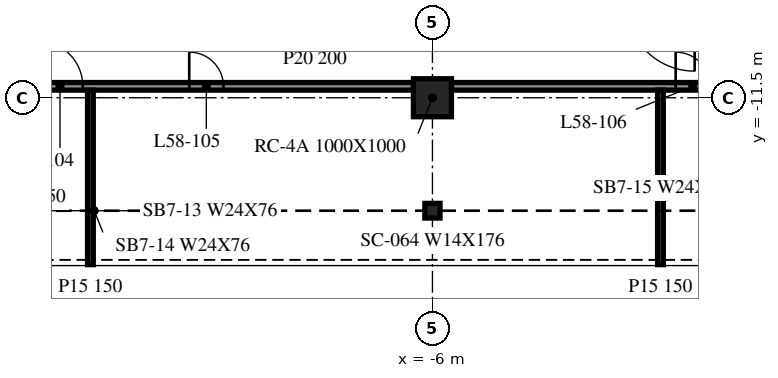
"""IFC4 building model, lengths in metres.
Left out: names, types, materials, properties, quantities, classifications, styles, units other than length and angle.
Written with IfcOpenShell. Run it as: python <this file> out.ifc"""

import sys

from ifc_helpers import new_model, si_unit, direction, frame, frame_2d, origin, origin_2d, place, context, subcontext, project, spatial, rectangle, i_section, extrude, element, fill, save


model = new_model("IFC4")
c1 = context("Model", 3, precision=1e-05, world=origin(), true_north=direction((0.0, 1.0)))
c2 = subcontext(c1, "Body", "Model", "MODEL_VIEW")
j1 = project(units=[si_unit("LENGTHUNIT", "METRE"), si_unit("PLANEANGLEUNIT", "RADIAN")], contexts=[c1])
p1 = place(None, origin())
s1 = spatial("IfcSite", under=j1, at=p1, CompositionType="ELEMENT")
p2 = place(p1, origin())
s2 = spatial("IfcBuilding", under=s1, at=p2, CompositionType="ELEMENT")
p3 = place(p2, frame((0.0, 0.0, 240.0)))
s3 = spatial("IfcBuildingStorey", under=s2, at=p3, CompositionType="ELEMENT", Elevation=240.0)
p4 = place(p3, frame((-6.0, -11.5, -0.34), z_axis=(0.0, 0.0, 1.0), x_axis=(1.0, 0.0, 0.0)))
e1 = element("IfcColumn", 1, at=p4, inside=s3, PredefinedType="COLUMN", context=c2, shape_type="SweptSolid", body=[
    extrude(rectangle(XDim=1.0, YDim=1.0, at=origin_2d()), origin(), (0.0, 0.0, 1.0), 3.8),
])
p5 = place(p3, frame((-6.0, -14.473, -0.34), z_axis=(0.0, 0.0, 1.0), x_axis=(1.0, 0.0, 0.0)))
e2 = element("IfcColumn", 2, at=p5, inside=s3, PredefinedType="COLUMN", context=c2, shape_type="SweptSolid", body=[
    extrude(i_section(OverallWidth=0.399, OverallDepth=0.386, WebThickness=0.021, FlangeThickness=0.033, at=origin_2d()), origin(), (0.0, 0.0, 1.0), 3.8),
])
p6 = place(p3, frame((-17.5, -11.2, 0.0), z_axis=(0.0, 0.0, 1.0), x_axis=(1.0, 0.0, 0.0)))
e3 = element("IfcWall", 3, at=p6, inside=s3, PredefinedType="PARTITIONING", context=c2, shape_type="SweptSolid", body=[
    extrude(rectangle(XDim=11.0, YDim=0.2, at=frame_2d((5.5, 0.0))), origin(), (0.0, 0.0, 1.0), 3.46),
])
p7 = place(p6, frame((1.1, 0.0, 0.0)))
e4 = element("IfcOpeningElement", 4, at=p7, cuts=e3, PredefinedType="OPENING", context=c2, shape_type="SweptSolid", body=[
    extrude(rectangle(XDim=1.2, YDim=2.1, at=frame_2d((0.6, 1.05))), frame((0.0, 0.11, 0.0), z_axis=(0.0, -1.0, 0.0), x_axis=(1.0, 0.0, 0.0)), (0.0, 0.0, 1.0), 0.22),
])
p8 = place(p6, frame((5.1, 0.0, 0.0)))
e5 = element("IfcOpeningElement", 5, at=p8, cuts=e3, PredefinedType="OPENING", context=c2, shape_type="SweptSolid", body=[
    extrude(rectangle(XDim=0.9, YDim=2.1, at=frame_2d((0.45, 1.05))), frame((0.0, 0.11, 0.0), z_axis=(0.0, -1.0, 0.0), x_axis=(1.0, 0.0, 0.0)), (0.0, 0.0, 1.0), 0.22),
])
p9 = place(p3, frame((-5.5, -11.2, 0.0), z_axis=(0.0, 0.0, 1.0), x_axis=(1.0, 0.0, 0.0)))
e6 = element("IfcWall", 6, at=p9, inside=s3, PredefinedType="PARTITIONING", context=c2, shape_type="SweptSolid", body=[
    extrude(rectangle(XDim=11.0, YDim=0.2, at=frame_2d((5.5, 0.0))), origin(), (0.0, 0.0, 1.0), 3.46),
])
p10 = place(p9, frame((5.9, 0.0, 0.0)))
e7 = element("IfcOpeningElement", 7, at=p10, cuts=e6, PredefinedType="OPENING", context=c2, shape_type="SweptSolid", body=[
    extrude(rectangle(XDim=0.9, YDim=2.1, at=frame_2d((0.45, 1.05))), frame((0.0, 0.11, 0.0), z_axis=(0.0, -1.0, 0.0), x_axis=(1.0, 0.0, 0.0)), (0.0, 0.0, 1.0), 0.22),
])
for number, where, z_axis, x_axis in (
    (8, (-15.0, -15.892, 0.0), (0.0, 0.0, 1.0), (0.0, 1.0, 0.0)),
    (9, (0.0, -15.892, 0.0), (0.0, 0.0, 1.0), (0.0, 1.0, 0.0)),
):
    element("IfcWall", number, at=place(p3, frame(where, z_axis=z_axis, x_axis=x_axis)), inside=s3, PredefinedType="PARTITIONING", context=c2, shape_type="SweptSolid", body=[
        extrude(rectangle(XDim=4.592, YDim=0.15, at=frame_2d((2.296, 0.0))), origin(), (0.0, 0.0, 1.0), 3.46),
    ])
p11 = place(p7, origin())
e10 = element("IfcDoor", 10, at=p11, inside=s3, OperationType="SINGLE_SWING_RIGHT", PredefinedType="DOOR", context=c2, shape_type="SweptSolid", body=[
    extrude(rectangle(XDim=1.2, YDim=2.1, at=frame_2d((0.6, 1.05))), frame((0.0, 0.025, 0.0), z_axis=(0.0, -1.0, 0.0), x_axis=(1.0, 0.0, 0.0)), (0.0, 0.0, 1.0), 0.05),
])
fill(e4, e10)
p12 = place(p8, origin())
e11 = element("IfcDoor", 11, at=p12, inside=s3, OperationType="SINGLE_SWING_LEFT", PredefinedType="DOOR", context=c2, shape_type="SweptSolid", body=[
    extrude(rectangle(XDim=0.9, YDim=2.1, at=frame_2d((0.45, 1.05))), frame((0.0, 0.025, 0.0), z_axis=(0.0, -1.0, 0.0), x_axis=(1.0, 0.0, 0.0)), (0.0, 0.0, 1.0), 0.05),
])
fill(e5, e11)
p13 = place(p10, origin())
e12 = element("IfcDoor", 12, at=p13, inside=s3, OperationType="SINGLE_SWING_LEFT", PredefinedType="DOOR", context=c2, shape_type="SweptSolid", body=[
    extrude(rectangle(XDim=0.9, YDim=2.1, at=frame_2d((0.45, 1.05))), frame((0.0, 0.025, 0.0), z_axis=(0.0, -1.0, 0.0), x_axis=(1.0, 0.0, 0.0)), (0.0, 0.0, 1.0), 0.05),
])
fill(e7, e12)
save(model, sys.argv[1])
